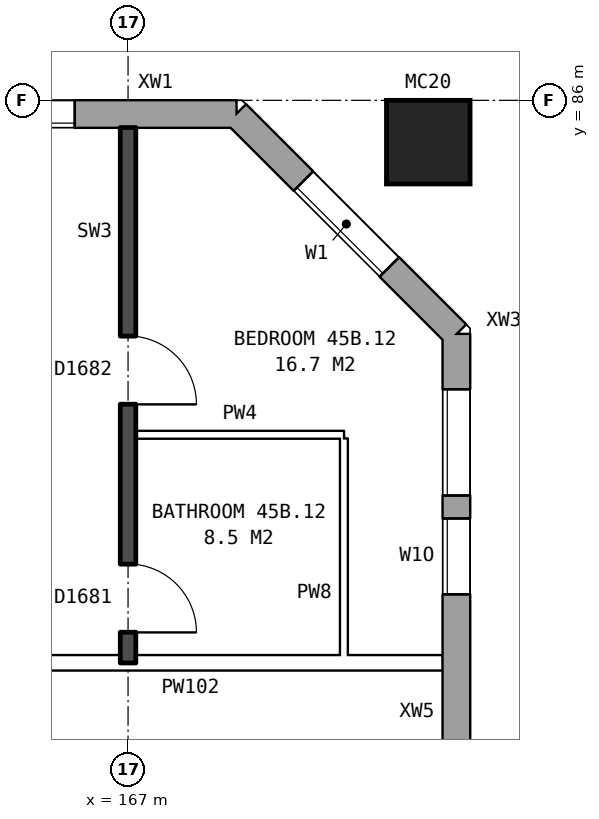
"""IFC4 building model, lengths in metres.
Left out: names, types, materials, properties, quantities, classifications, styles, units other than length and angle.
Written with IfcOpenShell. Run it as: python <this file> out.ifc"""

import sys

from ifc_helpers import new_model, si_unit, direction, frame, frame_2d, origin, origin_2d, place, context, subcontext, project, spatial, rectangle, hollow_rectangle, extrude, element, fill, save


model = new_model("IFC4")
c1 = context("Model", 3, precision=1e-05, world=origin(), true_north=direction((0.0, 1.0)))
c2 = subcontext(c1, "Body", "Model", "MODEL_VIEW")
j1 = project(units=[si_unit("LENGTHUNIT", "METRE"), si_unit("PLANEANGLEUNIT", "RADIAN")], contexts=[c1])
p1 = place(None, origin())
s1 = spatial("IfcSite", under=j1, at=p1, CompositionType="ELEMENT")
p2 = place(p1, origin())
s2 = spatial("IfcBuilding", under=s1, at=p2, CompositionType="ELEMENT")
p3 = place(p2, frame((0.0, 0.0, 160.9)))
s3 = spatial("IfcBuildingStorey", under=s2, at=p3, CompositionType="ELEMENT", Elevation=160.9)
p4 = place(p3, frame((170.95, 85.45, 0.0), z_axis=(0.0, 0.0, 1.0), x_axis=(1.0, 0.0, 0.0)))
e1 = element("IfcColumn", 1, at=p4, inside=s3, PredefinedType="COLUMN", context=c2, shape_type="SweptSolid", body=[
    extrude(hollow_rectangle(XDim=1.1, YDim=1.1, WallThickness=0.06, at=origin_2d()), origin(), (0.0, 0.0, 1.0), 3.1),
])
p5 = place(p3, frame((171.32, 57.075, 0.0), z_axis=(0.0, 0.0, 1.0), x_axis=(0.0, 1.0, 0.0)))
e2 = element("IfcWall", 2, at=p5, inside=s3, PredefinedType="STANDARD", context=c2, shape_type="SweptSolid", body=[
    extrude(rectangle(XDim=25.851, YDim=0.36, at=frame_2d((12.925, 0.0))), origin(), (0.0, 0.0, 1.0), 2.85),
])
p6 = place(p5, frame((0.3, 0.0, 0.8)))
e3 = element("IfcOpeningElement", 3, at=p6, cuts=e2, PredefinedType="OPENING", context=c2, shape_type="SweptSolid", body=[
    extrude(rectangle(XDim=1.4, YDim=1.8, at=frame_2d((0.7, 0.9))), frame((0.0, 0.19, 0.0), z_axis=(0.0, -1.0, 0.0), x_axis=(1.0, 0.0, 0.0)), (0.0, 0.0, 1.0), 0.38),
])
p7 = place(p5, frame((5.475, 0.0, 1.4)))
e4 = element("IfcOpeningElement", 4, at=p7, cuts=e2, PredefinedType="OPENING", context=c2, shape_type="SweptSolid", body=[
    extrude(rectangle(XDim=1.4, YDim=1.2, at=frame_2d((0.7, 0.6))), frame((0.0, 0.19, 0.0), z_axis=(0.0, -1.0, 0.0), x_axis=(1.0, 0.0, 0.0)), (0.0, 0.0, 1.0), 0.38),
])
p8 = place(p5, frame((7.625, 0.0, 0.8)))
e5 = element("IfcOpeningElement", 5, at=p8, cuts=e2, PredefinedType="OPENING", context=c2, shape_type="SweptSolid", body=[
    extrude(rectangle(XDim=1.6, YDim=1.8, at=frame_2d((0.8, 0.9))), frame((0.0, 0.19, 0.0), z_axis=(0.0, -1.0, 0.0), x_axis=(1.0, 0.0, 0.0)), (0.0, 0.0, 1.0), 0.38),
])
p9 = place(p5, frame((10.625, 0.0, 0.8)))
e6 = element("IfcOpeningElement", 6, at=p9, cuts=e2, PredefinedType="OPENING", context=c2, shape_type="SweptSolid", body=[
    extrude(rectangle(XDim=1.6, YDim=1.8, at=frame_2d((0.8, 0.9))), frame((0.0, 0.19, 0.0), z_axis=(0.0, -1.0, 0.0), x_axis=(1.0, 0.0, 0.0)), (0.0, 0.0, 1.0), 0.38),
])
p10 = place(p5, frame((13.625, 0.0, 0.8)))
e7 = element("IfcOpeningElement", 7, at=p10, cuts=e2, PredefinedType="OPENING", context=c2, shape_type="SweptSolid", body=[
    extrude(rectangle(XDim=1.6, YDim=1.8, at=frame_2d((0.8, 0.9))), frame((0.0, 0.19, 0.0), z_axis=(0.0, -1.0, 0.0), x_axis=(1.0, 0.0, 0.0)), (0.0, 0.0, 1.0), 0.38),
])
p11 = place(p5, frame((16.625, 0.0, 0.8)))
e8 = element("IfcOpeningElement", 8, at=p11, cuts=e2, PredefinedType="OPENING", context=c2, shape_type="SweptSolid", body=[
    extrude(rectangle(XDim=1.6, YDim=1.8, at=frame_2d((0.8, 0.9))), frame((0.0, 0.19, 0.0), z_axis=(0.0, -1.0, 0.0), x_axis=(1.0, 0.0, 0.0)), (0.0, 0.0, 1.0), 0.38),
])
p12 = place(p5, frame((9.525, 0.0, 0.8)))
e9 = element("IfcOpeningElement", 9, at=p12, cuts=e2, PredefinedType="OPENING", context=c2, shape_type="SweptSolid", body=[
    extrude(rectangle(XDim=0.8, YDim=1.8, at=frame_2d((0.4, 0.9))), frame((0.0, 0.19, 0.0), z_axis=(0.0, -1.0, 0.0), x_axis=(1.0, 0.0, 0.0)), (0.0, 0.0, 1.0), 0.38),
])
p13 = place(p5, frame((22.425, 0.0, 0.8)))
e10 = element("IfcOpeningElement", 10, at=p13, cuts=e2, PredefinedType="OPENING", context=c2, shape_type="SweptSolid", body=[
    extrude(rectangle(XDim=1.0, YDim=1.2, at=frame_2d((0.5, 0.6))), frame((0.0, 0.19, 0.0), z_axis=(0.0, -1.0, 0.0), x_axis=(1.0, 0.0, 0.0)), (0.0, 0.0, 1.0), 0.38),
])
p14 = place(p5, frame((2.0, 0.0, 0.8)))
e11 = element("IfcOpeningElement", 11, at=p14, cuts=e2, PredefinedType="OPENING", context=c2, shape_type="SweptSolid", body=[
    extrude(rectangle(XDim=0.8, YDim=1.5, at=frame_2d((0.4, 0.75))), frame((0.0, 0.19, 0.0), z_axis=(0.0, -1.0, 0.0), x_axis=(1.0, 0.0, 0.0)), (0.0, 0.0, 1.0), 0.38),
])
p15 = place(p5, frame((12.525, 0.0, 0.8)))
e12 = element("IfcOpeningElement", 12, at=p15, cuts=e2, PredefinedType="OPENING", context=c2, shape_type="SweptSolid", body=[
    extrude(rectangle(XDim=0.8, YDim=1.8, at=frame_2d((0.4, 0.9))), frame((0.0, 0.19, 0.0), z_axis=(0.0, -1.0, 0.0), x_axis=(1.0, 0.0, 0.0)), (0.0, 0.0, 1.0), 0.38),
])
p16 = place(p5, frame((15.525, 0.0, 0.8)))
e13 = element("IfcOpeningElement", 13, at=p16, cuts=e2, PredefinedType="OPENING", context=c2, shape_type="SweptSolid", body=[
    extrude(rectangle(XDim=0.8, YDim=1.8, at=frame_2d((0.4, 0.9))), frame((0.0, 0.19, 0.0), z_axis=(0.0, -1.0, 0.0), x_axis=(1.0, 0.0, 0.0)), (0.0, 0.0, 1.0), 0.38),
])
p17 = place(p5, frame((18.525, 0.0, 0.8)))
e14 = element("IfcOpeningElement", 14, at=p17, cuts=e2, PredefinedType="OPENING", context=c2, shape_type="SweptSolid", body=[
    extrude(rectangle(XDim=0.8, YDim=1.8, at=frame_2d((0.4, 0.9))), frame((0.0, 0.19, 0.0), z_axis=(0.0, -1.0, 0.0), x_axis=(1.0, 0.0, 0.0)), (0.0, 0.0, 1.0), 0.38),
])
p18 = place(p5, frame((23.725, 0.0, 0.8)))
e15 = element("IfcOpeningElement", 15, at=p18, cuts=e2, PredefinedType="OPENING", context=c2, shape_type="SweptSolid", body=[
    extrude(rectangle(XDim=1.4, YDim=1.8, at=frame_2d((0.7, 0.9))), frame((0.0, 0.19, 0.0), z_axis=(0.0, -1.0, 0.0), x_axis=(1.0, 0.0, 0.0)), (0.0, 0.0, 1.0), 0.38),
])
p19 = place(p3, frame((171.32, 82.925, 0.0), z_axis=(0.0, 0.0, 1.0), x_axis=(-0.707106781187, 0.707106781187, 0.0)))
e16 = element("IfcWall", 16, at=p19, inside=s3, PredefinedType="STANDARD", context=c2, shape_type="SweptSolid", body=[
    extrude(rectangle(XDim=4.094, YDim=0.36, at=frame_2d((2.047, 0.0))), origin(), (0.0, 0.0, 1.0), 2.85),
])
p20 = place(p19, frame((1.247, 0.0, 0.8)))
e17 = element("IfcOpeningElement", 17, at=p20, cuts=e16, PredefinedType="OPENING", context=c2, shape_type="SweptSolid", body=[
    extrude(rectangle(XDim=1.6, YDim=1.8, at=frame_2d((0.8, 0.9))), frame((0.0, 0.19, 0.0), z_axis=(0.0, -1.0, 0.0), x_axis=(1.0, 0.0, 0.0)), (0.0, 0.0, 1.0), 0.38),
])
p21 = place(p3, frame((168.425, 85.82, 0.0), z_axis=(0.0, 0.0, 1.0), x_axis=(-1.0, 0.0, 0.0)))
e18 = element("IfcWall", 18, at=p21, inside=s3, PredefinedType="STANDARD", context=c2, shape_type="SweptSolid", body=[
    extrude(rectangle(XDim=34.351, YDim=0.36, at=frame_2d((17.175, 0.0))), origin(), (0.0, 0.0, 1.0), 2.85),
])
p22 = place(p21, frame((2.125, 0.0, 0.8)))
e19 = element("IfcOpeningElement", 19, at=p22, cuts=e18, PredefinedType="OPENING", context=c2, shape_type="SweptSolid", body=[
    extrude(rectangle(XDim=1.6, YDim=1.8, at=frame_2d((0.8, 0.9))), frame((0.0, 0.19, 0.0), z_axis=(0.0, -1.0, 0.0), x_axis=(1.0, 0.0, 0.0)), (0.0, 0.0, 1.0), 0.38),
])
p23 = place(p21, frame((5.125, 0.0, 0.8)))
e20 = element("IfcOpeningElement", 20, at=p23, cuts=e18, PredefinedType="OPENING", context=c2, shape_type="SweptSolid", body=[
    extrude(rectangle(XDim=1.6, YDim=1.8, at=frame_2d((0.8, 0.9))), frame((0.0, 0.19, 0.0), z_axis=(0.0, -1.0, 0.0), x_axis=(1.0, 0.0, 0.0)), (0.0, 0.0, 1.0), 0.38),
])
p24 = place(p21, frame((8.125, 0.0, 0.8)))
e21 = element("IfcOpeningElement", 21, at=p24, cuts=e18, PredefinedType="OPENING", context=c2, shape_type="SweptSolid", body=[
    extrude(rectangle(XDim=1.6, YDim=1.8, at=frame_2d((0.8, 0.9))), frame((0.0, 0.19, 0.0), z_axis=(0.0, -1.0, 0.0), x_axis=(1.0, 0.0, 0.0)), (0.0, 0.0, 1.0), 0.38),
])
p25 = place(p21, frame((10.025, 0.0, 0.8)))
e22 = element("IfcOpeningElement", 22, at=p25, cuts=e18, PredefinedType="OPENING", context=c2, shape_type="SweptSolid", body=[
    extrude(rectangle(XDim=1.0, YDim=1.8, at=frame_2d((0.5, 0.9))), frame((0.0, 0.19, 0.0), z_axis=(0.0, -1.0, 0.0), x_axis=(1.0, 0.0, 0.0)), (0.0, 0.0, 1.0), 0.38),
])
p26 = place(p21, frame((14.125, 0.0, 0.8)))
e23 = element("IfcOpeningElement", 23, at=p26, cuts=e18, PredefinedType="OPENING", context=c2, shape_type="SweptSolid", body=[
    extrude(rectangle(XDim=1.6, YDim=1.8, at=frame_2d((0.8, 0.9))), frame((0.0, 0.19, 0.0), z_axis=(0.0, -1.0, 0.0), x_axis=(1.0, 0.0, 0.0)), (0.0, 0.0, 1.0), 0.38),
])
p27 = place(p21, frame((17.125, 0.0, 0.8)))
e24 = element("IfcOpeningElement", 24, at=p27, cuts=e18, PredefinedType="OPENING", context=c2, shape_type="SweptSolid", body=[
    extrude(rectangle(XDim=1.6, YDim=1.8, at=frame_2d((0.8, 0.9))), frame((0.0, 0.19, 0.0), z_axis=(0.0, -1.0, 0.0), x_axis=(1.0, 0.0, 0.0)), (0.0, 0.0, 1.0), 0.38),
])
p28 = place(p21, frame((19.625, 0.0, 0.65)))
e25 = element("IfcOpeningElement", 25, at=p28, cuts=e18, PredefinedType="OPENING", context=c2, shape_type="SweptSolid", body=[
    extrude(rectangle(XDim=0.6, YDim=1.8, at=frame_2d((0.3, 0.9))), frame((0.0, 0.19, 0.0), z_axis=(0.0, -1.0, 0.0), x_axis=(1.0, 0.0, 0.0)), (0.0, 0.0, 1.0), 0.38),
])
p29 = place(p21, frame((23.125, 0.0, 0.8)))
e26 = element("IfcOpeningElement", 26, at=p29, cuts=e18, PredefinedType="OPENING", context=c2, shape_type="SweptSolid", body=[
    extrude(rectangle(XDim=1.6, YDim=1.8, at=frame_2d((0.8, 0.9))), frame((0.0, 0.19, 0.0), z_axis=(0.0, -1.0, 0.0), x_axis=(1.0, 0.0, 0.0)), (0.0, 0.0, 1.0), 0.38),
])
p30 = place(p21, frame((26.125, 0.0, 0.8)))
e27 = element("IfcOpeningElement", 27, at=p30, cuts=e18, PredefinedType="OPENING", context=c2, shape_type="SweptSolid", body=[
    extrude(rectangle(XDim=1.6, YDim=1.8, at=frame_2d((0.8, 0.9))), frame((0.0, 0.19, 0.0), z_axis=(0.0, -1.0, 0.0), x_axis=(1.0, 0.0, 0.0)), (0.0, 0.0, 1.0), 0.38),
])
p31 = place(p21, frame((29.125, 0.0, 0.8)))
e28 = element("IfcOpeningElement", 28, at=p31, cuts=e18, PredefinedType="OPENING", context=c2, shape_type="SweptSolid", body=[
    extrude(rectangle(XDim=1.6, YDim=1.8, at=frame_2d((0.8, 0.9))), frame((0.0, 0.19, 0.0), z_axis=(0.0, -1.0, 0.0), x_axis=(1.0, 0.0, 0.0)), (0.0, 0.0, 1.0), 0.38),
])
p32 = place(p21, frame((32.125, 0.0, 0.8)))
e29 = element("IfcOpeningElement", 29, at=p32, cuts=e18, PredefinedType="OPENING", context=c2, shape_type="SweptSolid", body=[
    extrude(rectangle(XDim=1.6, YDim=1.8, at=frame_2d((0.8, 0.9))), frame((0.0, 0.19, 0.0), z_axis=(0.0, -1.0, 0.0), x_axis=(1.0, 0.0, 0.0)), (0.0, 0.0, 1.0), 0.38),
])
p33 = place(p21, frame((11.325, 0.0, 1.7)))
e30 = element("IfcOpeningElement", 30, at=p33, cuts=e18, PredefinedType="OPENING", context=c2, shape_type="SweptSolid", body=[
    extrude(rectangle(XDim=0.8, YDim=0.9, at=frame_2d((0.4, 0.45))), frame((0.0, 0.19, 0.0), z_axis=(0.0, -1.0, 0.0), x_axis=(1.0, 0.0, 0.0)), (0.0, 0.0, 1.0), 0.38),
])
p34 = place(p21, frame((20.525, 0.0, 0.55)))
e31 = element("IfcOpeningElement", 31, at=p34, cuts=e18, PredefinedType="OPENING", context=c2, shape_type="SweptSolid", body=[
    extrude(rectangle(XDim=0.8, YDim=0.9, at=frame_2d((0.4, 0.45))), frame((0.0, 0.19, 0.0), z_axis=(0.0, -1.0, 0.0), x_axis=(1.0, 0.0, 0.0)), (0.0, 0.0, 1.0), 0.38),
])
p35 = place(p3, frame((155.1, 78.6, 0.0), z_axis=(0.0, 0.0, 1.0), x_axis=(1.0, 0.0, 0.0)))
e32 = element("IfcWall", 32, at=p35, inside=s3, PredefinedType="PARTITIONING", context=c2, shape_type="SweptSolid", body=[
    extrude(rectangle(XDim=16.04, YDim=0.2, at=frame_2d((8.02, 0.0))), origin(), (0.0, 0.0, 1.0), 2.85),
])
p36 = place(p35, frame((3.6, 0.0, 0.0)))
e33 = element("IfcOpeningElement", 33, at=p36, cuts=e32, PredefinedType="OPENING", context=c2, shape_type="SweptSolid", body=[
    extrude(rectangle(XDim=1.0, YDim=2.1, at=frame_2d((0.5, 1.05))), frame((0.0, 0.11, 0.0), z_axis=(0.0, -1.0, 0.0), x_axis=(1.0, 0.0, 0.0)), (0.0, 0.0, 1.0), 0.22),
])
p37 = place(p35, frame((8.4, 0.0, 0.0)))
e34 = element("IfcOpeningElement", 34, at=p37, cuts=e32, PredefinedType="OPENING", context=c2, shape_type="SweptSolid", body=[
    extrude(rectangle(XDim=1.0, YDim=2.1, at=frame_2d((0.5, 1.05))), frame((0.0, 0.11, 0.0), z_axis=(0.0, -1.0, 0.0), x_axis=(1.0, 0.0, 0.0)), (0.0, 0.0, 1.0), 0.22),
])
p38 = place(p3, frame((167.1, 81.6, 0.0), z_axis=(0.0, 0.0, 1.0), x_axis=(1.0, 0.0, 0.0)))
e35 = element("IfcWall", 35, at=p38, inside=s3, PredefinedType="PARTITIONING", context=c2, shape_type="SweptSolid", body=[
    extrude(rectangle(XDim=2.74, YDim=0.1, at=frame_2d((1.37, 0.0))), origin(), (0.0, 0.0, 1.0), 2.85),
])
p39 = place(p3, frame((167.0, 78.6, 0.0), z_axis=(0.0, 0.0, 1.0), x_axis=(0.0, 1.0, 0.0)))
e36 = element("IfcWall", 36, at=p39, inside=s3, PredefinedType="SOLIDWALL", context=c2, shape_type="SweptSolid", body=[
    extrude(rectangle(XDim=7.04, YDim=0.2, at=frame_2d((3.52, 0.0))), origin(), (0.0, 0.0, 1.0), 2.85),
])
p40 = place(p39, frame((3.4, 0.0, 0.0)))
e37 = element("IfcOpeningElement", 37, at=p40, cuts=e36, PredefinedType="OPENING", context=c2, shape_type="SweptSolid", body=[
    extrude(rectangle(XDim=0.9, YDim=2.1, at=frame_2d((0.45, 1.05))), frame((0.0, 0.11, 0.0), z_axis=(0.0, -1.0, 0.0), x_axis=(1.0, 0.0, 0.0)), (0.0, 0.0, 1.0), 0.22),
])
p41 = place(p39, frame((0.4, 0.0, 0.0)))
e38 = element("IfcOpeningElement", 38, at=p41, cuts=e36, PredefinedType="OPENING", context=c2, shape_type="SweptSolid", body=[
    extrude(rectangle(XDim=0.9, YDim=2.1, at=frame_2d((0.45, 1.05))), frame((0.0, 0.11, 0.0), z_axis=(0.0, -1.0, 0.0), x_axis=(1.0, 0.0, 0.0)), (0.0, 0.0, 1.0), 0.22),
])
p42 = place(p3, frame((169.84, 78.7, 0.0), z_axis=(0.0, 0.0, 1.0), x_axis=(0.0, 1.0, 0.0)))
e39 = element("IfcWall", 39, at=p42, inside=s3, PredefinedType="PARTITIONING", context=c2, shape_type="SweptSolid", body=[
    extrude(rectangle(XDim=2.85, YDim=0.1, at=frame_2d((1.425, 0.0))), origin(), (0.0, 0.0, 1.0), 2.85),
])
p43 = place(p13, origin())
e40 = element("IfcWindow", 40, at=p43, inside=s3, PartitioningType="SINGLE_PANEL", PredefinedType="WINDOW", context=c2, shape_type="SweptSolid", body=[
    extrude(rectangle(XDim=1.0, YDim=1.2, at=frame_2d((0.5, 0.6))), frame((0.0, 0.15, 0.0), z_axis=(0.0, -1.0, 0.0), x_axis=(1.0, 0.0, 0.0)), (0.0, 0.0, 1.0), 0.06),
])
fill(e10, e40)
p44 = place(p20, origin())
e41 = element("IfcWindow", 41, at=p44, inside=s3, PartitioningType="SINGLE_PANEL", PredefinedType="WINDOW", context=c2, shape_type="SweptSolid", body=[
    extrude(rectangle(XDim=1.6, YDim=1.8, at=frame_2d((0.8, 0.9))), frame((0.0, 0.15, 0.0), z_axis=(0.0, -1.0, 0.0), x_axis=(1.0, 0.0, 0.0)), (0.0, 0.0, 1.0), 0.06),
])
fill(e17, e41)
p45 = place(p22, origin())
e42 = element("IfcWindow", 42, at=p45, inside=s3, PartitioningType="SINGLE_PANEL", PredefinedType="WINDOW", context=c2, shape_type="SweptSolid", body=[
    extrude(rectangle(XDim=1.6, YDim=1.8, at=frame_2d((0.8, 0.9))), frame((0.0, 0.15, 0.0), z_axis=(0.0, -1.0, 0.0), x_axis=(1.0, 0.0, 0.0)), (0.0, 0.0, 1.0), 0.06),
])
fill(e19, e42)
p46 = place(p40, frame((0.9, 0.0, 0.0), z_axis=(0.0, 0.0, 1.0), x_axis=(-1.0, 0.0, 0.0)))
e43 = element("IfcDoor", 43, at=p46, inside=s3, OperationType="SINGLE_SWING_RIGHT", PredefinedType="DOOR", context=c2, shape_type="SweptSolid", body=[
    extrude(rectangle(XDim=0.9, YDim=2.1, at=frame_2d((0.45, 1.05))), frame((0.0, 0.025, 0.0), z_axis=(0.0, -1.0, 0.0), x_axis=(1.0, 0.0, 0.0)), (0.0, 0.0, 1.0), 0.05),
])
fill(e37, e43)
p47 = place(p41, frame((0.9, 0.0, 0.0), z_axis=(0.0, 0.0, 1.0), x_axis=(-1.0, 0.0, 0.0)))
e44 = element("IfcDoor", 44, at=p47, inside=s3, OperationType="SINGLE_SWING_RIGHT", PredefinedType="DOOR", context=c2, shape_type="SweptSolid", body=[
    extrude(rectangle(XDim=0.9, YDim=2.1, at=frame_2d((0.45, 1.05))), frame((0.0, 0.025, 0.0), z_axis=(0.0, -1.0, 0.0), x_axis=(1.0, 0.0, 0.0)), (0.0, 0.0, 1.0), 0.05),
])
fill(e38, e44)
p48 = place(p18, origin())
e45 = element("IfcWindow", 45, at=p48, inside=s3, PartitioningType="SINGLE_PANEL", PredefinedType="WINDOW", context=c2, shape_type="SweptSolid", body=[
    extrude(rectangle(XDim=1.4, YDim=1.8, at=frame_2d((0.7, 0.9))), frame((0.0, 0.15, 0.0), z_axis=(0.0, -1.0, 0.0), x_axis=(1.0, 0.0, 0.0)), (0.0, 0.0, 1.0), 0.06),
])
fill(e15, e45)
save(model, sys.argv[1])
